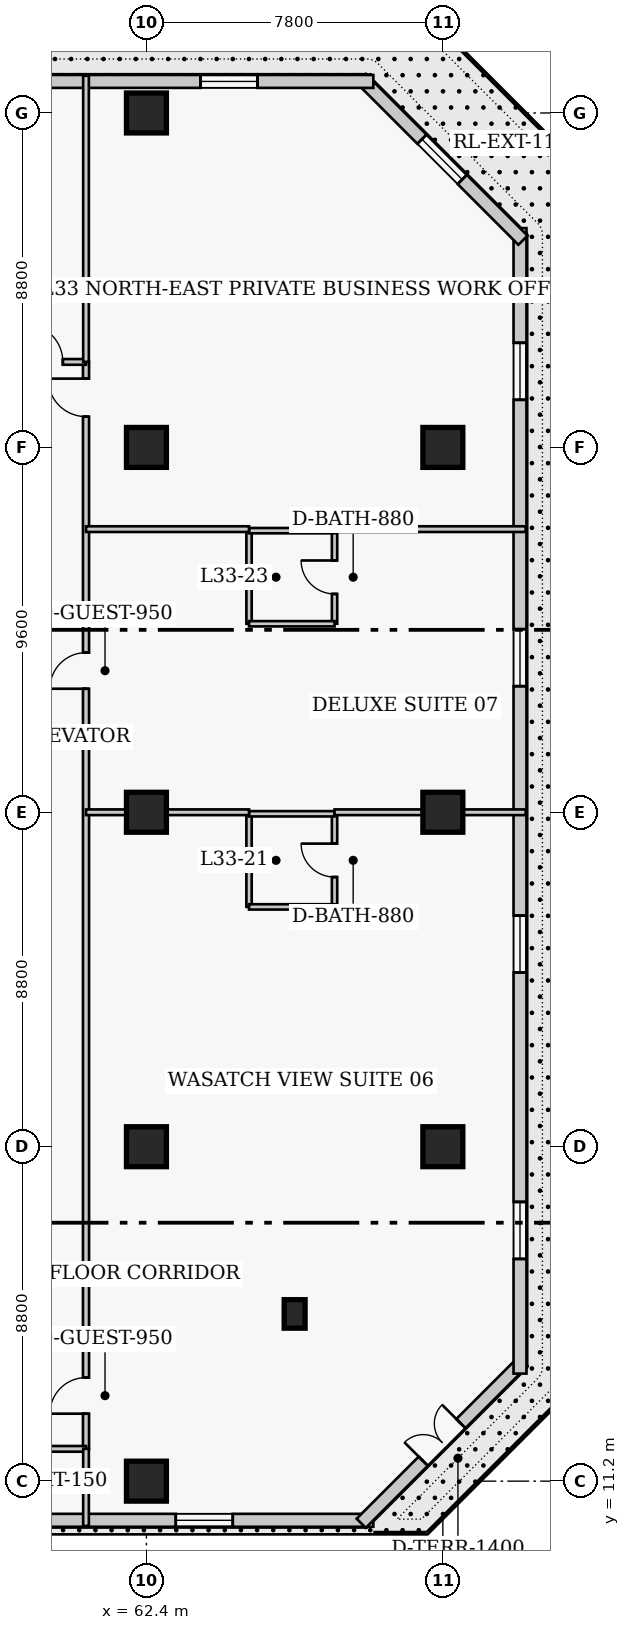
"""IFC4 building model, lengths in metres.
Left out: names, types, materials, properties, quantities, classifications, styles, units other than length and angle.
Written with IfcOpenShell. Run it as: python <this file> out.ifc"""

import sys

from ifc_helpers import new_model, si_unit, direction, frame, frame_2d, origin, origin_2d, place, context, subcontext, project, spatial, rectangle, extrude, element, fill, save


model = new_model("IFC4")
c1 = context("Model", 3, precision=1e-05, world=origin(), true_north=direction((0.0, 1.0)))
c2 = subcontext(c1, "Body", "Model", "MODEL_VIEW")
j1 = project(units=[si_unit("LENGTHUNIT", "METRE"), si_unit("PLANEANGLEUNIT", "RADIAN")], contexts=[c1])
p1 = place(None, origin())
s1 = spatial("IfcSite", under=j1, at=p1, CompositionType="ELEMENT")
p2 = place(p1, origin())
s2 = spatial("IfcBuilding", under=s1, at=p2, CompositionType="ELEMENT")
p3 = place(p2, frame((0.0, 0.0, 134.6)))
s3 = spatial("IfcBuildingStorey", under=s2, at=p3, CompositionType="ELEMENT", Elevation=134.6)
for number, where, z_axis, x_axis in (
    (1, (62.4, 11.2, 0.0), (0.0, 0.0, 1.0), (1.0, 0.0, 0.0)),
    (2, (62.4, 20.0, 0.0), (0.0, 0.0, 1.0), (1.0, 0.0, 0.0)),
    (3, (62.4, 28.8, 0.0), (0.0, 0.0, 1.0), (1.0, 0.0, 0.0)),
    (4, (62.4, 38.4, 0.0), (0.0, 0.0, 1.0), (1.0, 0.0, 0.0)),
    (5, (62.4, 47.2, 0.0), (0.0, 0.0, 1.0), (1.0, 0.0, 0.0)),
    (6, (70.2, 20.0, 0.0), (0.0, 0.0, 1.0), (1.0, 0.0, 0.0)),
    (7, (70.2, 28.8, 0.0), (0.0, 0.0, 1.0), (1.0, 0.0, 0.0)),
    (8, (70.2, 38.4, 0.0), (0.0, 0.0, 1.0), (1.0, 0.0, 0.0)),
):
    element("IfcColumn", number, at=place(p3, frame(where, z_axis=z_axis, x_axis=x_axis)), inside=s3, PredefinedType="COLUMN", context=c2, shape_type="SweptSolid", body=[
        extrude(rectangle(XDim=1.05, YDim=1.05, at=origin_2d()), origin(), (0.0, 0.0, 1.0), 3.8),
    ])
p4 = place(p3, frame((66.3, 15.6, 0.0), z_axis=(0.0, 0.0, 1.0), x_axis=(1.0, 0.0, 0.0)))
e9 = element("IfcColumn", 9, at=p4, inside=s3, PredefinedType="PILASTER", context=c2, shape_type="SweptSolid", body=[
    extrude(rectangle(XDim=0.55, YDim=0.75, at=origin_2d()), origin(), (0.0, 0.0, 1.0), 3.8),
])
p5 = place(p3, frame((41.68, 10.17, 0.0), z_axis=(0.0, 0.0, 1.0), x_axis=(1.0, 0.0, 0.0)))
e10 = element("IfcWall", 10, at=p5, inside=s3, PredefinedType="SOLIDWALL", context=c2, shape_type="SweptSolid", body=[
    extrude(rectangle(XDim=26.69, YDim=0.34, at=frame_2d((13.345, 0.0))), origin(), (0.0, 0.0, 1.0), 3.55),
])
p6 = place(p5, frame((2.548, 0.0, 0.85)))
e11 = element("IfcOpeningElement", 11, at=p6, cuts=e10, PredefinedType="OPENING", context=c2, shape_type="SweptSolid", body=[
    extrude(rectangle(XDim=1.5, YDim=1.75, at=frame_2d((0.75, 0.875))), frame((0.0, 0.18, 0.0), z_axis=(0.0, -1.0, 0.0), x_axis=(1.0, 0.0, 0.0)), (0.0, 0.0, 1.0), 0.36),
])
p7 = place(p5, frame((13.745, 0.0, 0.85)))
e12 = element("IfcOpeningElement", 12, at=p7, cuts=e10, PredefinedType="OPENING", context=c2, shape_type="SweptSolid", body=[
    extrude(rectangle(XDim=1.5, YDim=1.75, at=frame_2d((0.75, 0.875))), frame((0.0, 0.18, 0.0), z_axis=(0.0, -1.0, 0.0), x_axis=(1.0, 0.0, 0.0)), (0.0, 0.0, 1.0), 0.36),
])
p8 = place(p5, frame((21.492, 0.0, 0.85)))
e13 = element("IfcOpeningElement", 13, at=p8, cuts=e10, PredefinedType="OPENING", context=c2, shape_type="SweptSolid", body=[
    extrude(rectangle(XDim=1.5, YDim=1.75, at=frame_2d((0.75, 0.875))), frame((0.0, 0.18, 0.0), z_axis=(0.0, -1.0, 0.0), x_axis=(1.0, 0.0, 0.0)), (0.0, 0.0, 1.0), 0.36),
])
p9 = place(p3, frame((68.052, 10.092, 0.0), z_axis=(0.0, 0.0, 1.0), x_axis=(0.707106781187, 0.707106781187, 0.0)))
e14 = element("IfcWall", 14, at=p9, inside=s3, PredefinedType="SOLIDWALL", context=c2, shape_type="SweptSolid", body=[
    extrude(rectangle(XDim=6.02, YDim=0.34, at=frame_2d((3.01, 0.0))), origin(), (0.0, 0.0, 1.0), 3.55),
])
p10 = place(p9, frame((2.31, 0.0, 0.0)))
e15 = element("IfcOpeningElement", 15, at=p10, cuts=e14, PredefinedType="OPENING", context=c2, shape_type="SweptSolid", body=[
    extrude(rectangle(XDim=1.4, YDim=2.15, at=frame_2d((0.7, 1.075))), frame((0.0, 0.18, 0.0), z_axis=(0.0, -1.0, 0.0), x_axis=(1.0, 0.0, 0.0)), (0.0, 0.0, 1.0), 0.36),
])
p11 = place(p3, frame((72.23, 14.03, 0.0), z_axis=(0.0, 0.0, 1.0), x_axis=(0.0, 1.0, 0.0)))
e16 = element("IfcWall", 16, at=p11, inside=s3, PredefinedType="SOLIDWALL", context=c2, shape_type="SweptSolid", body=[
    extrude(rectangle(XDim=30.14, YDim=0.34, at=frame_2d((15.07, 0.0))), origin(), (0.0, 0.0, 1.0), 3.55),
])
p12 = place(p11, frame((3.018, 0.0, 0.85)))
e17 = element("IfcOpeningElement", 17, at=p12, cuts=e16, PredefinedType="OPENING", context=c2, shape_type="SweptSolid", body=[
    extrude(rectangle(XDim=1.5, YDim=1.75, at=frame_2d((0.75, 0.875))), frame((0.0, 0.18, 0.0), z_axis=(0.0, -1.0, 0.0), x_axis=(1.0, 0.0, 0.0)), (0.0, 0.0, 1.0), 0.36),
])
p13 = place(p11, frame((10.552, 0.0, 0.85)))
e18 = element("IfcOpeningElement", 18, at=p13, cuts=e16, PredefinedType="OPENING", context=c2, shape_type="SweptSolid", body=[
    extrude(rectangle(XDim=1.5, YDim=1.75, at=frame_2d((0.75, 0.875))), frame((0.0, 0.18, 0.0), z_axis=(0.0, -1.0, 0.0), x_axis=(1.0, 0.0, 0.0)), (0.0, 0.0, 1.0), 0.36),
])
p14 = place(p11, frame((18.087, 0.0, 0.85)))
e19 = element("IfcOpeningElement", 19, at=p14, cuts=e16, PredefinedType="OPENING", context=c2, shape_type="SweptSolid", body=[
    extrude(rectangle(XDim=1.5, YDim=1.75, at=frame_2d((0.75, 0.875))), frame((0.0, 0.18, 0.0), z_axis=(0.0, -1.0, 0.0), x_axis=(1.0, 0.0, 0.0)), (0.0, 0.0, 1.0), 0.36),
])
p15 = place(p11, frame((25.623, 0.0, 0.85)))
e20 = element("IfcOpeningElement", 20, at=p15, cuts=e16, PredefinedType="OPENING", context=c2, shape_type="SweptSolid", body=[
    extrude(rectangle(XDim=1.5, YDim=1.75, at=frame_2d((0.75, 0.875))), frame((0.0, 0.18, 0.0), z_axis=(0.0, -1.0, 0.0), x_axis=(1.0, 0.0, 0.0)), (0.0, 0.0, 1.0), 0.36),
])
p16 = place(p3, frame((72.308, 43.852, 0.0), z_axis=(0.0, 0.0, 1.0), x_axis=(-0.707106781187, 0.707106781187, 0.0)))
e21 = element("IfcWall", 21, at=p16, inside=s3, PredefinedType="SOLIDWALL", context=c2, shape_type="SweptSolid", body=[
    extrude(rectangle(XDim=6.02, YDim=0.34, at=frame_2d((3.01, 0.0))), origin(), (0.0, 0.0, 1.0), 3.55),
])
p17 = place(p16, frame((2.26, 0.0, 0.85)))
e22 = element("IfcOpeningElement", 22, at=p17, cuts=e21, PredefinedType="OPENING", context=c2, shape_type="SweptSolid", body=[
    extrude(rectangle(XDim=1.5, YDim=1.75, at=frame_2d((0.75, 0.875))), frame((0.0, 0.18, 0.0), z_axis=(0.0, -1.0, 0.0), x_axis=(1.0, 0.0, 0.0)), (0.0, 0.0, 1.0), 0.36),
])
p18 = place(p3, frame((68.37, 48.03, 0.0), z_axis=(0.0, 0.0, 1.0), x_axis=(-1.0, 0.0, 0.0)))
e23 = element("IfcWall", 23, at=p18, inside=s3, PredefinedType="SOLIDWALL", context=c2, shape_type="SweptSolid", body=[
    extrude(rectangle(XDim=26.69, YDim=0.34, at=frame_2d((13.345, 0.0))), origin(), (0.0, 0.0, 1.0), 3.55),
])
p19 = place(p18, frame((3.048, 0.0, 0.85)))
e24 = element("IfcOpeningElement", 24, at=p19, cuts=e23, PredefinedType="OPENING", context=c2, shape_type="SweptSolid", body=[
    extrude(rectangle(XDim=1.5, YDim=1.75, at=frame_2d((0.75, 0.875))), frame((0.0, 0.18, 0.0), z_axis=(0.0, -1.0, 0.0), x_axis=(1.0, 0.0, 0.0)), (0.0, 0.0, 1.0), 0.36),
])
p20 = place(p18, frame((11.445, 0.0, 0.85)))
e25 = element("IfcOpeningElement", 25, at=p20, cuts=e23, PredefinedType="OPENING", context=c2, shape_type="SweptSolid", body=[
    extrude(rectangle(XDim=1.5, YDim=1.75, at=frame_2d((0.75, 0.875))), frame((0.0, 0.18, 0.0), z_axis=(0.0, -1.0, 0.0), x_axis=(1.0, 0.0, 0.0)), (0.0, 0.0, 1.0), 0.36),
])
p21 = place(p18, frame((22.642, 0.0, 0.85)))
e26 = element("IfcOpeningElement", 26, at=p21, cuts=e23, PredefinedType="OPENING", context=c2, shape_type="SweptSolid", body=[
    extrude(rectangle(XDim=1.5, YDim=1.75, at=frame_2d((0.75, 0.875))), frame((0.0, 0.18, 0.0), z_axis=(0.0, -1.0, 0.0), x_axis=(1.0, 0.0, 0.0)), (0.0, 0.0, 1.0), 0.36),
])
p22 = place(p3, frame((60.81, 12.05, 0.0), z_axis=(0.0, 0.0, 1.0), x_axis=(0.0, 1.0, 0.0)))
e27 = element("IfcWall", 27, at=p22, inside=s3, PredefinedType="PARTITIONING", context=c2, shape_type="SweptSolid", body=[
    extrude(rectangle(XDim=28.6, YDim=0.16, at=frame_2d((14.3, 0.0))), origin(), (0.0, 0.0, 1.0), 3.55),
])
p23 = place(p22, frame((0.925, 0.0, 0.0)))
e28 = element("IfcOpeningElement", 28, at=p23, cuts=e27, PredefinedType="OPENING", context=c2, shape_type="SweptSolid", body=[
    extrude(rectangle(XDim=0.95, YDim=2.1, at=frame_2d((0.475, 1.05))), frame((0.0, 0.09, 0.0), z_axis=(0.0, -1.0, 0.0), x_axis=(1.0, 0.0, 0.0)), (0.0, 0.0, 1.0), 0.18),
])
p24 = place(p22, frame((20.0, 0.0, 0.0)))
e29 = element("IfcOpeningElement", 29, at=p24, cuts=e27, PredefinedType="OPENING", context=c2, shape_type="SweptSolid", body=[
    extrude(rectangle(XDim=0.95, YDim=2.1, at=frame_2d((0.475, 1.05))), frame((0.0, 0.09, 0.0), z_axis=(0.0, -1.0, 0.0), x_axis=(1.0, 0.0, 0.0)), (0.0, 0.0, 1.0), 0.18),
])
p25 = place(p22, frame((27.16, 0.0, 0.0)))
e30 = element("IfcOpeningElement", 30, at=p25, cuts=e27, PredefinedType="OPENING", context=c2, shape_type="SweptSolid", body=[
    extrude(rectangle(XDim=1.0, YDim=2.15, at=frame_2d((0.5, 1.075))), frame((0.0, 0.09, 0.0), z_axis=(0.0, -1.0, 0.0), x_axis=(1.0, 0.0, 0.0)), (0.0, 0.0, 1.0), 0.18),
])
p26 = place(p3, frame((58.59, 12.05, 0.0), z_axis=(0.0, 0.0, 1.0), x_axis=(1.0, 0.0, 0.0)))
e31 = element("IfcWall", 31, at=p26, inside=s3, PredefinedType="PARTITIONING", context=c2, shape_type="SweptSolid", body=[
    extrude(rectangle(XDim=2.22, YDim=0.15, at=frame_2d((1.11, 0.0))), origin(), (0.0, 0.0, 1.0), 3.55),
])
p27 = place(p3, frame((56.8, 40.65, 0.0), z_axis=(0.0, 0.0, 1.0), x_axis=(1.0, 0.0, 0.0)))
e32 = element("IfcWall", 32, at=p27, inside=s3, PredefinedType="PARTITIONING", context=c2, shape_type="SweptSolid", body=[
    extrude(rectangle(XDim=4.01, YDim=0.15, at=frame_2d((2.005, 0.0))), origin(), (0.0, 0.0, 1.0), 3.55),
])
p28 = place(p27, frame((2.4, 0.0, 0.0)))
e33 = element("IfcOpeningElement", 33, at=p28, cuts=e32, PredefinedType="OPENING", context=c2, shape_type="SweptSolid", body=[
    extrude(rectangle(XDim=1.0, YDim=2.15, at=frame_2d((0.5, 1.075))), frame((0.0, 0.085, 0.0), z_axis=(0.0, -1.0, 0.0), x_axis=(1.0, 0.0, 0.0)), (0.0, 0.0, 1.0), 0.17),
])
p29 = place(p3, frame((60.81, 40.65, 0.0), z_axis=(0.0, 0.0, 1.0), x_axis=(0.0, 1.0, 0.0)))
e34 = element("IfcWall", 34, at=p29, inside=s3, PredefinedType="PARTITIONING", context=c2, shape_type="SweptSolid", body=[
    extrude(rectangle(XDim=7.53, YDim=0.15, at=frame_2d((3.765, 0.0))), origin(), (0.0, 0.0, 1.0), 3.55),
])
p30 = place(p3, frame((60.81, 10.02, 0.0), z_axis=(0.0, 0.0, 1.0), x_axis=(0.0, 1.0, 0.0)))
e35 = element("IfcWall", 35, at=p30, inside=s3, PredefinedType="PARTITIONING", context=c2, shape_type="SweptSolid", body=[
    extrude(rectangle(XDim=2.03, YDim=0.15, at=frame_2d((1.015, 0.0))), origin(), (0.0, 0.0, 1.0), 3.55),
])
p31 = place(p3, frame((65.1, 26.31, 0.0), z_axis=(0.0, 0.0, 1.0), x_axis=(0.0, 1.0, 0.0)))
e36 = element("IfcWall", 36, at=p31, inside=s3, PredefinedType="PLUMBINGWALL", context=c2, shape_type="SweptSolid", body=[
    extrude(rectangle(XDim=2.45, YDim=0.14, at=frame_2d((1.225, 0.0))), origin(), (0.0, 0.0, 1.0), 3.55),
])
p32 = place(p3, frame((67.35, 26.31, 0.0), z_axis=(0.0, 0.0, 1.0), x_axis=(0.0, 1.0, 0.0)))
e37 = element("IfcWall", 37, at=p32, inside=s3, PredefinedType="PLUMBINGWALL", context=c2, shape_type="SweptSolid", body=[
    extrude(rectangle(XDim=2.45, YDim=0.14, at=frame_2d((1.225, 0.0))), origin(), (0.0, 0.0, 1.0), 3.55),
])
p33 = place(p32, frame((0.785, 0.0, 0.0)))
e38 = element("IfcOpeningElement", 38, at=p33, cuts=e37, PredefinedType="OPENING", context=c2, shape_type="SweptSolid", body=[
    extrude(rectangle(XDim=0.88, YDim=2.05, at=frame_2d((0.44, 1.025))), frame((0.0, 0.08, 0.0), z_axis=(0.0, -1.0, 0.0), x_axis=(1.0, 0.0, 0.0)), (0.0, 0.0, 1.0), 0.16),
])
p34 = place(p3, frame((65.1, 26.31, 0.0), z_axis=(0.0, 0.0, 1.0), x_axis=(1.0, 0.0, 0.0)))
e39 = element("IfcWall", 39, at=p34, inside=s3, PredefinedType="PLUMBINGWALL", context=c2, shape_type="SweptSolid", body=[
    extrude(rectangle(XDim=2.25, YDim=0.14, at=frame_2d((1.125, 0.0))), origin(), (0.0, 0.0, 1.0), 3.55),
])
p35 = place(p3, frame((65.1, 28.76, 0.0), z_axis=(0.0, 0.0, 1.0), x_axis=(1.0, 0.0, 0.0)))
e40 = element("IfcWall", 40, at=p35, inside=s3, PredefinedType="PLUMBINGWALL", context=c2, shape_type="SweptSolid", body=[
    extrude(rectangle(XDim=2.25, YDim=0.14, at=frame_2d((1.125, 0.0))), origin(), (0.0, 0.0, 1.0), 2.9),
])
p36 = place(p3, frame((60.81, 28.8, 0.0), z_axis=(0.0, 0.0, 1.0), x_axis=(1.0, 0.0, 0.0)))
e41 = element("IfcWall", 41, at=p36, inside=s3, PredefinedType="PARTITIONING", context=c2, shape_type="SweptSolid", body=[
    extrude(rectangle(XDim=4.29, YDim=0.15, at=frame_2d((2.145, 0.0))), origin(), (0.0, 0.0, 1.0), 2.778),
])
p37 = place(p3, frame((67.35, 28.8, 0.0), z_axis=(0.0, 0.0, 1.0), x_axis=(1.0, 0.0, 0.0)))
e42 = element("IfcWall", 42, at=p37, inside=s3, PredefinedType="PARTITIONING", context=c2, shape_type="SweptSolid", body=[
    extrude(rectangle(XDim=5.03, YDim=0.15, at=frame_2d((2.515, 0.0))), origin(), (0.0, 0.0, 1.0), 2.778),
])
p38 = place(p3, frame((65.1, 33.76, 0.0), z_axis=(0.0, 0.0, 1.0), x_axis=(0.0, 1.0, 0.0)))
e43 = element("IfcWall", 43, at=p38, inside=s3, PredefinedType="PLUMBINGWALL", context=c2, shape_type="SweptSolid", body=[
    extrude(rectangle(XDim=2.45, YDim=0.14, at=frame_2d((1.225, 0.0))), origin(), (0.0, 0.0, 1.0), 3.55),
])
p39 = place(p3, frame((67.35, 33.76, 0.0), z_axis=(0.0, 0.0, 1.0), x_axis=(0.0, 1.0, 0.0)))
e44 = element("IfcWall", 44, at=p39, inside=s3, PredefinedType="PLUMBINGWALL", context=c2, shape_type="SweptSolid", body=[
    extrude(rectangle(XDim=2.45, YDim=0.14, at=frame_2d((1.225, 0.0))), origin(), (0.0, 0.0, 1.0), 3.55),
])
p40 = place(p39, frame((0.785, 0.0, 0.0)))
e45 = element("IfcOpeningElement", 45, at=p40, cuts=e44, PredefinedType="OPENING", context=c2, shape_type="SweptSolid", body=[
    extrude(rectangle(XDim=0.88, YDim=2.05, at=frame_2d((0.44, 1.025))), frame((0.0, 0.08, 0.0), z_axis=(0.0, -1.0, 0.0), x_axis=(1.0, 0.0, 0.0)), (0.0, 0.0, 1.0), 0.16),
])
for number, where, z_axis, x_axis in (
    (46, (65.1, 33.76, 0.0), (0.0, 0.0, 1.0), (1.0, 0.0, 0.0)),
    (47, (65.1, 36.21, 0.0), (0.0, 0.0, 1.0), (1.0, 0.0, 0.0)),
):
    element("IfcWall", number, at=place(p3, frame(where, z_axis=z_axis, x_axis=x_axis)), inside=s3, PredefinedType="PLUMBINGWALL", context=c2, shape_type="SweptSolid", body=[
        extrude(rectangle(XDim=2.25, YDim=0.14, at=frame_2d((1.125, 0.0))), origin(), (0.0, 0.0, 1.0), 3.55),
    ])
p41 = place(p3, frame((60.81, 36.25, 0.0), z_axis=(0.0, 0.0, 1.0), x_axis=(1.0, 0.0, 0.0)))
e48 = element("IfcWall", 48, at=p41, inside=s3, PredefinedType="PARTITIONING", context=c2, shape_type="SweptSolid", body=[
    extrude(rectangle(XDim=4.29, YDim=0.15, at=frame_2d((2.145, 0.0))), origin(), (0.0, 0.0, 1.0), 3.55),
])
p42 = place(p3, frame((67.35, 36.25, 0.0), z_axis=(0.0, 0.0, 1.0), x_axis=(1.0, 0.0, 0.0)))
e49 = element("IfcWall", 49, at=p42, inside=s3, PredefinedType="PARTITIONING", context=c2, shape_type="SweptSolid", body=[
    extrude(rectangle(XDim=5.03, YDim=0.15, at=frame_2d((2.515, 0.0))), origin(), (0.0, 0.0, 1.0), 3.55),
])
p43 = place(p8, origin())
e50 = element("IfcWindow", 50, at=p43, inside=s3, PartitioningType="SINGLE_PANEL", PredefinedType="WINDOW", context=c2, shape_type="SweptSolid", body=[
    extrude(rectangle(XDim=1.5, YDim=1.75, at=frame_2d((0.75, 0.875))), frame((0.0, 0.03, 0.0), z_axis=(0.0, -1.0, 0.0), x_axis=(1.0, 0.0, 0.0)), (0.0, 0.0, 1.0), 0.06),
])
fill(e13, e50)
p44 = place(p10, origin())
e51 = element("IfcDoor", 51, at=p44, inside=s3, OperationType="DOUBLE_DOOR_SINGLE_SWING", PredefinedType="DOOR", context=c2, shape_type="SweptSolid", body=[
    extrude(rectangle(XDim=1.4, YDim=2.15, at=frame_2d((0.7, 1.075))), frame((0.0, 0.025, 0.0), z_axis=(0.0, -1.0, 0.0), x_axis=(1.0, 0.0, 0.0)), (0.0, 0.0, 1.0), 0.05),
])
fill(e15, e51)
p45 = place(p12, origin())
e52 = element("IfcWindow", 52, at=p45, inside=s3, PartitioningType="SINGLE_PANEL", PredefinedType="WINDOW", context=c2, shape_type="SweptSolid", body=[
    extrude(rectangle(XDim=1.5, YDim=1.75, at=frame_2d((0.75, 0.875))), frame((0.0, 0.03, 0.0), z_axis=(0.0, -1.0, 0.0), x_axis=(1.0, 0.0, 0.0)), (0.0, 0.0, 1.0), 0.06),
])
fill(e17, e52)
p46 = place(p13, origin())
e53 = element("IfcWindow", 53, at=p46, inside=s3, PartitioningType="SINGLE_PANEL", PredefinedType="WINDOW", context=c2, shape_type="SweptSolid", body=[
    extrude(rectangle(XDim=1.5, YDim=1.75, at=frame_2d((0.75, 0.875))), frame((0.0, 0.03, 0.0), z_axis=(0.0, -1.0, 0.0), x_axis=(1.0, 0.0, 0.0)), (0.0, 0.0, 1.0), 0.06),
])
fill(e18, e53)
p47 = place(p14, origin())
e54 = element("IfcWindow", 54, at=p47, inside=s3, PartitioningType="SINGLE_PANEL", PredefinedType="WINDOW", context=c2, shape_type="SweptSolid", body=[
    extrude(rectangle(XDim=1.5, YDim=1.75, at=frame_2d((0.75, 0.875))), frame((0.0, 0.03, 0.0), z_axis=(0.0, -1.0, 0.0), x_axis=(1.0, 0.0, 0.0)), (0.0, 0.0, 1.0), 0.06),
])
fill(e19, e54)
p48 = place(p15, origin())
e55 = element("IfcWindow", 55, at=p48, inside=s3, PartitioningType="SINGLE_PANEL", PredefinedType="WINDOW", context=c2, shape_type="SweptSolid", body=[
    extrude(rectangle(XDim=1.5, YDim=1.75, at=frame_2d((0.75, 0.875))), frame((0.0, 0.03, 0.0), z_axis=(0.0, -1.0, 0.0), x_axis=(1.0, 0.0, 0.0)), (0.0, 0.0, 1.0), 0.06),
])
fill(e20, e55)
p49 = place(p17, origin())
e56 = element("IfcWindow", 56, at=p49, inside=s3, PartitioningType="SINGLE_PANEL", PredefinedType="WINDOW", context=c2, shape_type="SweptSolid", body=[
    extrude(rectangle(XDim=1.5, YDim=1.75, at=frame_2d((0.75, 0.875))), frame((0.0, 0.03, 0.0), z_axis=(0.0, -1.0, 0.0), x_axis=(1.0, 0.0, 0.0)), (0.0, 0.0, 1.0), 0.06),
])
fill(e22, e56)
p50 = place(p19, origin())
e57 = element("IfcWindow", 57, at=p50, inside=s3, PartitioningType="SINGLE_PANEL", PredefinedType="WINDOW", context=c2, shape_type="SweptSolid", body=[
    extrude(rectangle(XDim=1.5, YDim=1.75, at=frame_2d((0.75, 0.875))), frame((0.0, 0.03, 0.0), z_axis=(0.0, -1.0, 0.0), x_axis=(1.0, 0.0, 0.0)), (0.0, 0.0, 1.0), 0.06),
])
fill(e24, e57)
p51 = place(p28, origin())
e58 = element("IfcDoor", 58, at=p51, inside=s3, OperationType="SINGLE_SWING_LEFT", PredefinedType="DOOR", context=c2, shape_type="SweptSolid", body=[
    extrude(rectangle(XDim=1.0, YDim=2.15, at=frame_2d((0.5, 1.075))), frame((0.0, 0.025, 0.0), z_axis=(0.0, -1.0, 0.0), x_axis=(1.0, 0.0, 0.0)), (0.0, 0.0, 1.0), 0.05),
])
fill(e33, e58)
p52 = place(p33, origin())
e59 = element("IfcDoor", 59, at=p52, inside=s3, OperationType="SINGLE_SWING_RIGHT", PredefinedType="DOOR", context=c2, shape_type="SweptSolid", body=[
    extrude(rectangle(XDim=0.88, YDim=2.05, at=frame_2d((0.44, 1.025))), frame((0.0, 0.025, 0.0), z_axis=(0.0, -1.0, 0.0), x_axis=(1.0, 0.0, 0.0)), (0.0, 0.0, 1.0), 0.05),
])
fill(e38, e59)
p53 = place(p23, origin())
e60 = element("IfcDoor", 60, at=p53, inside=s3, OperationType="SINGLE_SWING_LEFT", PredefinedType="DOOR", context=c2, shape_type="SweptSolid", body=[
    extrude(rectangle(XDim=0.95, YDim=2.1, at=frame_2d((0.475, 1.05))), frame((0.0, 0.025, 0.0), z_axis=(0.0, -1.0, 0.0), x_axis=(1.0, 0.0, 0.0)), (0.0, 0.0, 1.0), 0.05),
])
fill(e28, e60)
p54 = place(p40, origin())
e61 = element("IfcDoor", 61, at=p54, inside=s3, OperationType="SINGLE_SWING_RIGHT", PredefinedType="DOOR", context=c2, shape_type="SweptSolid", body=[
    extrude(rectangle(XDim=0.88, YDim=2.05, at=frame_2d((0.44, 1.025))), frame((0.0, 0.025, 0.0), z_axis=(0.0, -1.0, 0.0), x_axis=(1.0, 0.0, 0.0)), (0.0, 0.0, 1.0), 0.05),
])
fill(e45, e61)
p55 = place(p24, origin())
e62 = element("IfcDoor", 62, at=p55, inside=s3, OperationType="SINGLE_SWING_LEFT", PredefinedType="DOOR", context=c2, shape_type="SweptSolid", body=[
    extrude(rectangle(XDim=0.95, YDim=2.1, at=frame_2d((0.475, 1.05))), frame((0.0, 0.025, 0.0), z_axis=(0.0, -1.0, 0.0), x_axis=(1.0, 0.0, 0.0)), (0.0, 0.0, 1.0), 0.05),
])
fill(e29, e62)
p56 = place(p25, origin())
e63 = element("IfcDoor", 63, at=p56, inside=s3, OperationType="SINGLE_SWING_RIGHT", PredefinedType="DOOR", context=c2, shape_type="SweptSolid", body=[
    extrude(rectangle(XDim=1.0, YDim=2.15, at=frame_2d((0.5, 1.075))), frame((0.0, 0.025, 0.0), z_axis=(0.0, -1.0, 0.0), x_axis=(1.0, 0.0, 0.0)), (0.0, 0.0, 1.0), 0.05),
])
fill(e30, e63)
save(model, sys.argv[1])
